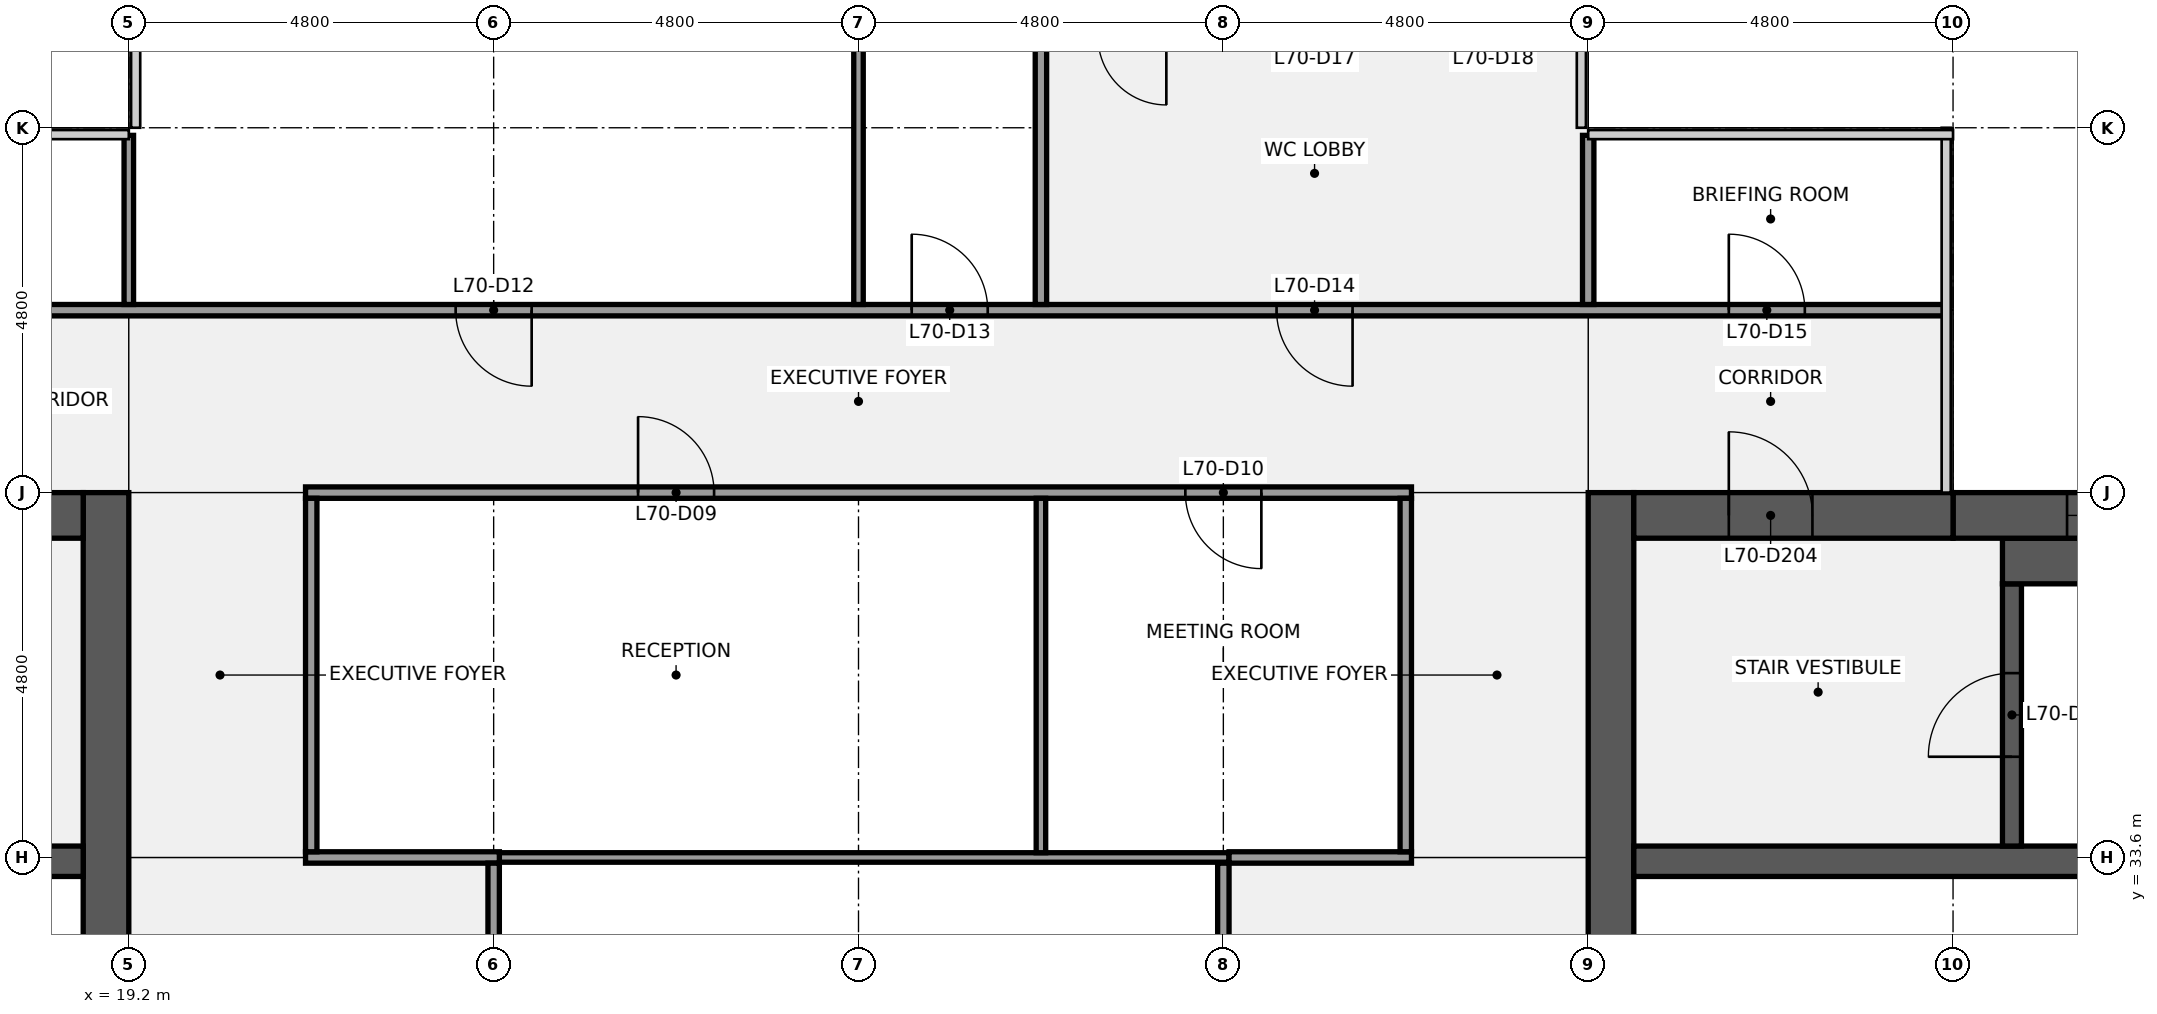
"""IFC4 building model, lengths in metres.
Left out: names, types, materials, properties, quantities, classifications, styles, units other than length and angle.
Written with IfcOpenShell. Run it as: python <this file> out.ifc"""

import sys

from ifc_helpers import new_model, si_unit, direction, frame, frame_2d, origin, place, context, subcontext, project, spatial, rectangle, extrude, element, fill, save


model = new_model("IFC4")
c1 = context("Model", 3, precision=1e-05, world=origin(), true_north=direction((0.0, 1.0)))
c2 = subcontext(c1, "Body", "Model", "MODEL_VIEW")
j1 = project(units=[si_unit("LENGTHUNIT", "METRE"), si_unit("PLANEANGLEUNIT", "RADIAN")], contexts=[c1])
p1 = place(None, origin())
s1 = spatial("IfcSite", under=j1, at=p1, CompositionType="ELEMENT")
p2 = place(p1, origin())
s2 = spatial("IfcBuilding", under=s1, at=p2, CompositionType="ELEMENT")
p3 = place(p2, frame((0.0, 0.0, 318.3)))
s3 = spatial("IfcBuildingStorey", under=s2, at=p3, CompositionType="ELEMENT", Elevation=318.3)
p4 = place(p3, frame((18.9, 38.4, 0.0), z_axis=(0.0, 0.0, 1.0), x_axis=(0.0, -1.0, 0.0)))
e1 = element("IfcWall", 1, at=p4, inside=s3, PredefinedType="SHEAR", context=c2, shape_type="SweptSolid", body=[
    extrude(rectangle(XDim=28.8, YDim=0.6, at=frame_2d((14.4, 0.0))), origin(), (0.0, 0.0, 1.0), 3.84),
])
p5 = place(p4, frame((18.3, 0.0, 0.0)))
e2 = element("IfcOpeningElement", 2, at=p5, cuts=e1, PredefinedType="OPENING", context=c2, shape_type="SweptSolid", body=[
    extrude(rectangle(XDim=1.8, YDim=2.1, at=frame_2d((0.9, 1.05))), frame((0.0, 0.31, 0.0), z_axis=(0.0, -1.0, 0.0), x_axis=(1.0, 0.0, 0.0)), (0.0, 0.0, 1.0), 0.62),
])
p6 = place(p4, frame((8.7, 0.0, 0.0)))
e3 = element("IfcOpeningElement", 3, at=p6, cuts=e1, PredefinedType="OPENING", context=c2, shape_type="SweptSolid", body=[
    extrude(rectangle(XDim=1.8, YDim=2.1, at=frame_2d((0.9, 1.05))), frame((0.0, 0.31, 0.0), z_axis=(0.0, -1.0, 0.0), x_axis=(1.0, 0.0, 0.0)), (0.0, 0.0, 1.0), 0.62),
])
p7 = place(p3, frame((0.6, 33.55, 0.0), z_axis=(0.0, 0.0, 1.0), x_axis=(1.0, 0.0, 0.0)))
e4 = element("IfcWall", 4, at=p7, inside=s3, PredefinedType="SHEAR", context=c2, shape_type="SweptSolid", body=[
    extrude(rectangle(XDim=18.0, YDim=0.4, at=frame_2d((9.0, 0.0))), origin(), (0.0, 0.0, 1.0), 3.84),
])
p8 = place(p3, frame((14.4, 38.1, 0.0), z_axis=(0.0, 0.0, 1.0), x_axis=(1.0, 0.0, 0.0)))
e5 = element("IfcWall", 5, at=p8, inside=s3, PredefinedType="SHEAR", context=c2, shape_type="SweptSolid", body=[
    extrude(rectangle(XDim=4.2, YDim=0.6, at=frame_2d((2.1, 0.0))), origin(), (0.0, 0.0, 1.0), 3.84),
])
p9 = place(p8, frame((1.85, 0.0, 0.0)))
e6 = element("IfcOpeningElement", 6, at=p9, cuts=e5, PredefinedType="OPENING", context=c2, shape_type="SweptSolid", body=[
    extrude(rectangle(XDim=1.1, YDim=2.1, at=frame_2d((0.55, 1.05))), frame((0.0, 0.31, 0.0), z_axis=(0.0, -1.0, 0.0), x_axis=(1.0, 0.0, 0.0)), (0.0, 0.0, 1.0), 0.62),
])
p10 = place(p3, frame((38.7, 9.6, 0.0), z_axis=(0.0, 0.0, 1.0), x_axis=(0.0, 1.0, 0.0)))
e7 = element("IfcWall", 7, at=p10, inside=s3, PredefinedType="SHEAR", context=c2, shape_type="SweptSolid", body=[
    extrude(rectangle(XDim=28.8, YDim=0.6, at=frame_2d((14.4, 0.0))), origin(), (0.0, 0.0, 1.0), 3.84),
])
p11 = place(p10, frame((8.7, 0.0, 0.0)))
e8 = element("IfcOpeningElement", 8, at=p11, cuts=e7, PredefinedType="OPENING", context=c2, shape_type="SweptSolid", body=[
    extrude(rectangle(XDim=1.8, YDim=2.1, at=frame_2d((0.9, 1.05))), frame((0.0, 0.31, 0.0), z_axis=(0.0, -1.0, 0.0), x_axis=(1.0, 0.0, 0.0)), (0.0, 0.0, 1.0), 0.62),
])
p12 = place(p10, frame((18.3, 0.0, 0.0)))
e9 = element("IfcOpeningElement", 9, at=p12, cuts=e7, PredefinedType="OPENING", context=c2, shape_type="SweptSolid", body=[
    extrude(rectangle(XDim=1.8, YDim=2.1, at=frame_2d((0.9, 1.05))), frame((0.0, 0.31, 0.0), z_axis=(0.0, -1.0, 0.0), x_axis=(1.0, 0.0, 0.0)), (0.0, 0.0, 1.0), 0.62),
])
p13 = place(p3, frame((39.0, 33.55, 0.0), z_axis=(0.0, 0.0, 1.0), x_axis=(1.0, 0.0, 0.0)))
e10 = element("IfcWall", 10, at=p13, inside=s3, PredefinedType="SHEAR", context=c2, shape_type="SweptSolid", body=[
    extrude(rectangle(XDim=18.0, YDim=0.4, at=frame_2d((9.0, 0.0))), origin(), (0.0, 0.0, 1.0), 3.84),
])
p14 = place(p3, frame((43.975, 33.75, 0.0), z_axis=(0.0, 0.0, 1.0), x_axis=(0.0, 1.0, 0.0)))
e11 = element("IfcWall", 11, at=p14, inside=s3, PredefinedType="SHEAR", context=c2, shape_type="SweptSolid", body=[
    extrude(rectangle(XDim=3.45, YDim=0.25, at=frame_2d((1.725, 0.0))), origin(), (0.0, 0.0, 1.0), 3.84),
])
p15 = place(p14, frame((1.175, 0.0, 0.0)))
e12 = element("IfcOpeningElement", 12, at=p15, cuts=e11, PredefinedType="OPENING", context=c2, shape_type="SweptSolid", body=[
    extrude(rectangle(XDim=1.1, YDim=2.1, at=frame_2d((0.55, 1.05))), frame((0.0, 0.135, 0.0), z_axis=(0.0, -1.0, 0.0), x_axis=(1.0, 0.0, 0.0)), (0.0, 0.0, 1.0), 0.27),
])
p16 = place(p3, frame((43.85, 37.5, 0.0), z_axis=(0.0, 0.0, 1.0), x_axis=(1.0, 0.0, 0.0)))
e13 = element("IfcWall", 13, at=p16, inside=s3, PredefinedType="SHEAR", context=c2, shape_type="SweptSolid", body=[
    extrude(rectangle(XDim=7.5, YDim=0.6, at=frame_2d((3.75, 0.0))), origin(), (0.0, 0.0, 1.0), 3.84),
])
p17 = place(p3, frame((43.2, 38.1, 0.0), z_axis=(0.0, 0.0, 1.0), x_axis=(1.0, 0.0, 0.0)))
e14 = element("IfcWall", 14, at=p17, inside=s3, PredefinedType="SHEAR", context=c2, shape_type="SweptSolid", body=[
    extrude(rectangle(XDim=13.8, YDim=0.6, at=frame_2d((6.9, 0.0))), origin(), (0.0, 0.0, 1.0), 3.84),
])
p18 = place(p17, frame((6.3, 0.0, 0.9)))
e15 = element("IfcOpeningElement", 15, at=p18, cuts=e14, PredefinedType="OPENING", context=c2, shape_type="SweptSolid", body=[
    extrude(rectangle(XDim=1.8, YDim=1.5, at=frame_2d((0.9, 0.75))), frame((0.0, 0.31, 0.0), z_axis=(0.0, -1.0, 0.0), x_axis=(1.0, 0.0, 0.0)), (0.0, 0.0, 1.0), 0.62),
])
p19 = place(p17, frame((1.5, 0.0, 0.9)))
e16 = element("IfcOpeningElement", 16, at=p19, cuts=e14, PredefinedType="OPENING", context=c2, shape_type="SweptSolid", body=[
    extrude(rectangle(XDim=1.8, YDim=1.5, at=frame_2d((0.9, 0.75))), frame((0.0, 0.31, 0.0), z_axis=(0.0, -1.0, 0.0), x_axis=(1.0, 0.0, 0.0)), (0.0, 0.0, 1.0), 0.62),
])
p20 = place(p3, frame((39.0, 38.1, 0.0), z_axis=(0.0, 0.0, 1.0), x_axis=(1.0, 0.0, 0.0)))
e17 = element("IfcWall", 17, at=p20, inside=s3, PredefinedType="SHEAR", context=c2, shape_type="SweptSolid", body=[
    extrude(rectangle(XDim=4.2, YDim=0.6, at=frame_2d((2.1, 0.0))), origin(), (0.0, 0.0, 1.0), 3.84),
])
p21 = place(p20, frame((1.25, 0.0, 0.0)))
e18 = element("IfcOpeningElement", 18, at=p21, cuts=e17, PredefinedType="OPENING", context=c2, shape_type="SweptSolid", body=[
    extrude(rectangle(XDim=1.1, YDim=2.1, at=frame_2d((0.55, 1.05))), frame((0.0, 0.31, 0.0), z_axis=(0.0, -1.0, 0.0), x_axis=(1.0, 0.0, 0.0)), (0.0, 0.0, 1.0), 0.62),
])
p22 = place(p3, frame((24.075, 33.6, 0.0), z_axis=(0.0, 0.0, 1.0), x_axis=(1.0, 0.0, 0.0)))
e19 = element("IfcWall", 19, at=p22, inside=s3, PredefinedType="PARTITIONING", context=c2, shape_type="SweptSolid", body=[
    extrude(rectangle(XDim=9.6, YDim=0.125, at=frame_2d((4.8, 0.0))), origin(), (0.0, 0.0, 1.0), 2.87),
])
p23 = place(p3, frame((21.525, 33.6, 0.0), z_axis=(0.0, 0.0, 1.0), x_axis=(1.0, 0.0, 0.0)))
e20 = element("IfcWall", 20, at=p23, inside=s3, PredefinedType="PARTITIONING", context=c2, shape_type="SweptSolid", body=[
    extrude(rectangle(XDim=2.55, YDim=0.15, at=frame_2d((1.275, 0.0))), origin(), (0.0, 0.0, 1.0), 2.87),
])
p24 = place(p3, frame((33.675, 33.6, 0.0), z_axis=(0.0, 0.0, 1.0), x_axis=(1.0, 0.0, 0.0)))
e21 = element("IfcWall", 21, at=p24, inside=s3, PredefinedType="PARTITIONING", context=c2, shape_type="SweptSolid", body=[
    extrude(rectangle(XDim=2.4, YDim=0.15, at=frame_2d((1.2, 0.0))), origin(), (0.0, 0.0, 1.0), 2.87),
])
p25 = place(p3, frame((21.525, 38.4, 0.0), z_axis=(0.0, 0.0, 1.0), x_axis=(1.0, 0.0, 0.0)))
e22 = element("IfcWall", 22, at=p25, inside=s3, PredefinedType="PARTITIONING", context=c2, shape_type="SweptSolid", body=[
    extrude(rectangle(XDim=14.55, YDim=0.15, at=frame_2d((7.275, 0.0))), origin(), (0.0, 0.0, 1.0), 2.87),
])
p26 = place(p25, frame((4.375, 0.0, 0.0)))
e23 = element("IfcOpeningElement", 23, at=p26, cuts=e22, PredefinedType="OPENING", context=c2, shape_type="SweptSolid", body=[
    extrude(rectangle(XDim=1.0, YDim=2.1, at=frame_2d((0.5, 1.05))), frame((0.0, 0.085, 0.0), z_axis=(0.0, -1.0, 0.0), x_axis=(1.0, 0.0, 0.0)), (0.0, 0.0, 1.0), 0.17),
])
p27 = place(p25, frame((11.575, 0.0, 0.0)))
e24 = element("IfcOpeningElement", 24, at=p27, cuts=e22, PredefinedType="OPENING", context=c2, shape_type="SweptSolid", body=[
    extrude(rectangle(XDim=1.0, YDim=2.1, at=frame_2d((0.5, 1.05))), frame((0.0, 0.085, 0.0), z_axis=(0.0, -1.0, 0.0), x_axis=(1.0, 0.0, 0.0)), (0.0, 0.0, 1.0), 0.17),
])
p28 = place(p3, frame((14.5, 40.8, 0.0), z_axis=(0.0, 0.0, 1.0), x_axis=(1.0, 0.0, 0.0)))
e25 = element("IfcWall", 25, at=p28, inside=s3, PredefinedType="PARTITIONING", context=c2, shape_type="SweptSolid", body=[
    extrude(rectangle(XDim=28.6, YDim=0.15, at=frame_2d((14.3, 0.0))), origin(), (0.0, 0.0, 1.0), 2.87),
])
p29 = place(p28, frame((1.85, 0.0, 0.0)))
e26 = element("IfcOpeningElement", 26, at=p29, cuts=e25, PredefinedType="OPENING", context=c2, shape_type="SweptSolid", body=[
    extrude(rectangle(XDim=1.0, YDim=2.1, at=frame_2d((0.5, 1.05))), frame((0.0, 0.085, 0.0), z_axis=(0.0, -1.0, 0.0), x_axis=(1.0, 0.0, 0.0)), (0.0, 0.0, 1.0), 0.17),
])
p30 = place(p28, frame((9.0, 0.0, 0.0)))
e27 = element("IfcOpeningElement", 27, at=p30, cuts=e25, PredefinedType="OPENING", context=c2, shape_type="SweptSolid", body=[
    extrude(rectangle(XDim=1.0, YDim=2.1, at=frame_2d((0.5, 1.05))), frame((0.0, 0.085, 0.0), z_axis=(0.0, -1.0, 0.0), x_axis=(1.0, 0.0, 0.0)), (0.0, 0.0, 1.0), 0.17),
])
p31 = place(p28, frame((15.0, 0.0, 0.0)))
e28 = element("IfcOpeningElement", 28, at=p31, cuts=e25, PredefinedType="OPENING", context=c2, shape_type="SweptSolid", body=[
    extrude(rectangle(XDim=1.0, YDim=2.1, at=frame_2d((0.5, 1.05))), frame((0.0, 0.085, 0.0), z_axis=(0.0, -1.0, 0.0), x_axis=(1.0, 0.0, 0.0)), (0.0, 0.0, 1.0), 0.17),
])
p32 = place(p28, frame((19.8, 0.0, 0.0)))
e29 = element("IfcOpeningElement", 29, at=p32, cuts=e25, PredefinedType="OPENING", context=c2, shape_type="SweptSolid", body=[
    extrude(rectangle(XDim=1.0, YDim=2.1, at=frame_2d((0.5, 1.05))), frame((0.0, 0.085, 0.0), z_axis=(0.0, -1.0, 0.0), x_axis=(1.0, 0.0, 0.0)), (0.0, 0.0, 1.0), 0.17),
])
p33 = place(p28, frame((25.75, 0.0, 0.0)))
e30 = element("IfcOpeningElement", 30, at=p33, cuts=e25, PredefinedType="OPENING", context=c2, shape_type="SweptSolid", body=[
    extrude(rectangle(XDim=1.0, YDim=2.1, at=frame_2d((0.5, 1.05))), frame((0.0, 0.085, 0.0), z_axis=(0.0, -1.0, 0.0), x_axis=(1.0, 0.0, 0.0)), (0.0, 0.0, 1.0), 0.17),
])
p34 = place(p3, frame((19.2, 40.875, 0.0), z_axis=(0.0, 0.0, 1.0), x_axis=(0.0, 1.0, 0.0)))
e31 = element("IfcWall", 31, at=p34, inside=s3, PredefinedType="PARTITIONING", context=c2, shape_type="SweptSolid", body=[
    extrude(rectangle(XDim=2.225, YDim=0.125, at=frame_2d((1.113, 0.0))), origin(), (0.0, 0.0, 1.0), 2.87),
])
p35 = place(p3, frame((21.6, 33.675, 0.0), z_axis=(0.0, 0.0, 1.0), x_axis=(0.0, 1.0, 0.0)))
e32 = element("IfcWall", 32, at=p35, inside=s3, PredefinedType="PARTITIONING", context=c2, shape_type="SweptSolid", body=[
    extrude(rectangle(XDim=4.65, YDim=0.15, at=frame_2d((2.325, 0.0))), origin(), (0.0, 0.0, 1.0), 2.87),
])
p36 = place(p3, frame((24.0, 27.663, 0.0), z_axis=(0.0, 0.0, 1.0), x_axis=(0.0, 1.0, 0.0)))
e33 = element("IfcWall", 33, at=p36, inside=s3, PredefinedType="PARTITIONING", context=c2, shape_type="SweptSolid", body=[
    extrude(rectangle(XDim=5.862, YDim=0.15, at=frame_2d((2.931, 0.0))), origin(), (0.0, 0.0, 1.0), 2.87),
])
p37 = place(p36, frame((2.431, 0.0, 0.0)))
e34 = element("IfcOpeningElement", 34, at=p37, cuts=e33, PredefinedType="OPENING", context=c2, shape_type="SweptSolid", body=[
    extrude(rectangle(XDim=1.0, YDim=2.1, at=frame_2d((0.5, 1.05))), frame((0.0, 0.085, 0.0), z_axis=(0.0, -1.0, 0.0), x_axis=(1.0, 0.0, 0.0)), (0.0, 0.0, 1.0), 0.17),
])
p38 = place(p3, frame((28.8, 40.875, 0.0), z_axis=(0.0, 0.0, 1.0), x_axis=(0.0, 1.0, 0.0)))
e35 = element("IfcWall", 35, at=p38, inside=s3, PredefinedType="PARTITIONING", context=c2, shape_type="SweptSolid", body=[
    extrude(rectangle(XDim=6.625, YDim=0.125, at=frame_2d((3.312, 0.0))), origin(), (0.0, 0.0, 1.0), 2.87),
])
p39 = place(p3, frame((31.2, 33.663, 0.0), z_axis=(0.0, 0.0, 1.0), x_axis=(0.0, 1.0, 0.0)))
e36 = element("IfcWall", 36, at=p39, inside=s3, PredefinedType="PARTITIONING", context=c2, shape_type="SweptSolid", body=[
    extrude(rectangle(XDim=4.662, YDim=0.125, at=frame_2d((2.331, 0.0))), origin(), (0.0, 0.0, 1.0), 2.87),
])
p40 = place(p3, frame((31.2, 40.875, 0.0), z_axis=(0.0, 0.0, 1.0), x_axis=(0.0, 1.0, 0.0)))
e37 = element("IfcWall", 37, at=p40, inside=s3, PredefinedType="PARTITIONING", context=c2, shape_type="SweptSolid", body=[
    extrude(rectangle(XDim=3.45, YDim=0.15, at=frame_2d((1.725, 0.0))), origin(), (0.0, 0.0, 1.0), 2.87),
])
p41 = place(p3, frame((33.6, 27.663, 0.0), z_axis=(0.0, 0.0, 1.0), x_axis=(0.0, 1.0, 0.0)))
e38 = element("IfcWall", 38, at=p41, inside=s3, PredefinedType="PARTITIONING", context=c2, shape_type="SweptSolid", body=[
    extrude(rectangle(XDim=5.862, YDim=0.15, at=frame_2d((2.931, 0.0))), origin(), (0.0, 0.0, 1.0), 2.87),
])
p42 = place(p3, frame((36.0, 33.675, 0.0), z_axis=(0.0, 0.0, 1.0), x_axis=(0.0, 1.0, 0.0)))
e39 = element("IfcWall", 39, at=p42, inside=s3, PredefinedType="PARTITIONING", context=c2, shape_type="SweptSolid", body=[
    extrude(rectangle(XDim=4.65, YDim=0.15, at=frame_2d((2.325, 0.0))), origin(), (0.0, 0.0, 1.0), 2.87),
])
p43 = place(p3, frame((38.4, 40.875, 0.0), z_axis=(0.0, 0.0, 1.0), x_axis=(0.0, 1.0, 0.0)))
e40 = element("IfcWall", 40, at=p43, inside=s3, PredefinedType="PARTITIONING", context=c2, shape_type="SweptSolid", body=[
    extrude(rectangle(XDim=2.225, YDim=0.15, at=frame_2d((1.113, 0.0))), origin(), (0.0, 0.0, 1.0), 2.87),
])
p44 = place(p15, origin())
e41 = element("IfcDoor", 41, at=p44, inside=s3, OperationType="SINGLE_SWING_LEFT", PredefinedType="DOOR", context=c2, shape_type="SweptSolid", body=[
    extrude(rectangle(XDim=1.1, YDim=2.1, at=frame_2d((0.55, 1.05))), frame((0.0, 0.025, 0.0), z_axis=(0.0, -1.0, 0.0), x_axis=(1.0, 0.0, 0.0)), (0.0, 0.0, 1.0), 0.05),
])
fill(e12, e41)
p45 = place(p21, origin())
e42 = element("IfcDoor", 42, at=p45, inside=s3, OperationType="SINGLE_SWING_LEFT", PredefinedType="DOOR", context=c2, shape_type="SweptSolid", body=[
    extrude(rectangle(XDim=1.1, YDim=2.1, at=frame_2d((0.55, 1.05))), frame((0.0, 0.025, 0.0), z_axis=(0.0, -1.0, 0.0), x_axis=(1.0, 0.0, 0.0)), (0.0, 0.0, 1.0), 0.05),
])
fill(e18, e42)
p46 = place(p19, origin())
e43 = element("IfcWindow", 43, at=p46, inside=s3, PartitioningType="SINGLE_PANEL", PredefinedType="WINDOW", context=c2, shape_type="SweptSolid", body=[
    extrude(rectangle(XDim=1.8, YDim=1.5, at=frame_2d((0.9, 0.75))), frame((0.0, 0.03, 0.0), z_axis=(0.0, -1.0, 0.0), x_axis=(1.0, 0.0, 0.0)), (0.0, 0.0, 1.0), 0.06),
])
fill(e16, e43)
p47 = place(p26, origin())
e44 = element("IfcDoor", 44, at=p47, inside=s3, OperationType="SINGLE_SWING_LEFT", PredefinedType="DOOR", context=c2, shape_type="SweptSolid", body=[
    extrude(rectangle(XDim=1.0, YDim=2.1, at=frame_2d((0.5, 1.05))), frame((0.0, 0.025, 0.0), z_axis=(0.0, -1.0, 0.0), x_axis=(1.0, 0.0, 0.0)), (0.0, 0.0, 1.0), 0.05),
])
fill(e23, e44)
p48 = place(p27, origin())
e45 = element("IfcDoor", 45, at=p48, inside=s3, OperationType="SINGLE_SWING_RIGHT", PredefinedType="DOOR", context=c2, shape_type="SweptSolid", body=[
    extrude(rectangle(XDim=1.0, YDim=2.1, at=frame_2d((0.5, 1.05))), frame((0.0, 0.025, 0.0), z_axis=(0.0, -1.0, 0.0), x_axis=(1.0, 0.0, 0.0)), (0.0, 0.0, 1.0), 0.05),
])
fill(e24, e45)
p49 = place(p30, origin())
e46 = element("IfcDoor", 46, at=p49, inside=s3, OperationType="SINGLE_SWING_RIGHT", PredefinedType="DOOR", context=c2, shape_type="SweptSolid", body=[
    extrude(rectangle(XDim=1.0, YDim=2.1, at=frame_2d((0.5, 1.05))), frame((0.0, 0.025, 0.0), z_axis=(0.0, -1.0, 0.0), x_axis=(1.0, 0.0, 0.0)), (0.0, 0.0, 1.0), 0.05),
])
fill(e27, e46)
p50 = place(p31, origin())
e47 = element("IfcDoor", 47, at=p50, inside=s3, OperationType="SINGLE_SWING_LEFT", PredefinedType="DOOR", context=c2, shape_type="SweptSolid", body=[
    extrude(rectangle(XDim=1.0, YDim=2.1, at=frame_2d((0.5, 1.05))), frame((0.0, 0.025, 0.0), z_axis=(0.0, -1.0, 0.0), x_axis=(1.0, 0.0, 0.0)), (0.0, 0.0, 1.0), 0.05),
])
fill(e28, e47)
p51 = place(p32, origin())
e48 = element("IfcDoor", 48, at=p51, inside=s3, OperationType="SINGLE_SWING_RIGHT", PredefinedType="DOOR", context=c2, shape_type="SweptSolid", body=[
    extrude(rectangle(XDim=1.0, YDim=2.1, at=frame_2d((0.5, 1.05))), frame((0.0, 0.025, 0.0), z_axis=(0.0, -1.0, 0.0), x_axis=(1.0, 0.0, 0.0)), (0.0, 0.0, 1.0), 0.05),
])
fill(e29, e48)
p52 = place(p33, origin())
e49 = element("IfcDoor", 49, at=p52, inside=s3, OperationType="SINGLE_SWING_LEFT", PredefinedType="DOOR", context=c2, shape_type="SweptSolid", body=[
    extrude(rectangle(XDim=1.0, YDim=2.1, at=frame_2d((0.5, 1.05))), frame((0.0, 0.025, 0.0), z_axis=(0.0, -1.0, 0.0), x_axis=(1.0, 0.0, 0.0)), (0.0, 0.0, 1.0), 0.05),
])
fill(e30, e49)
save(model, sys.argv[1])
